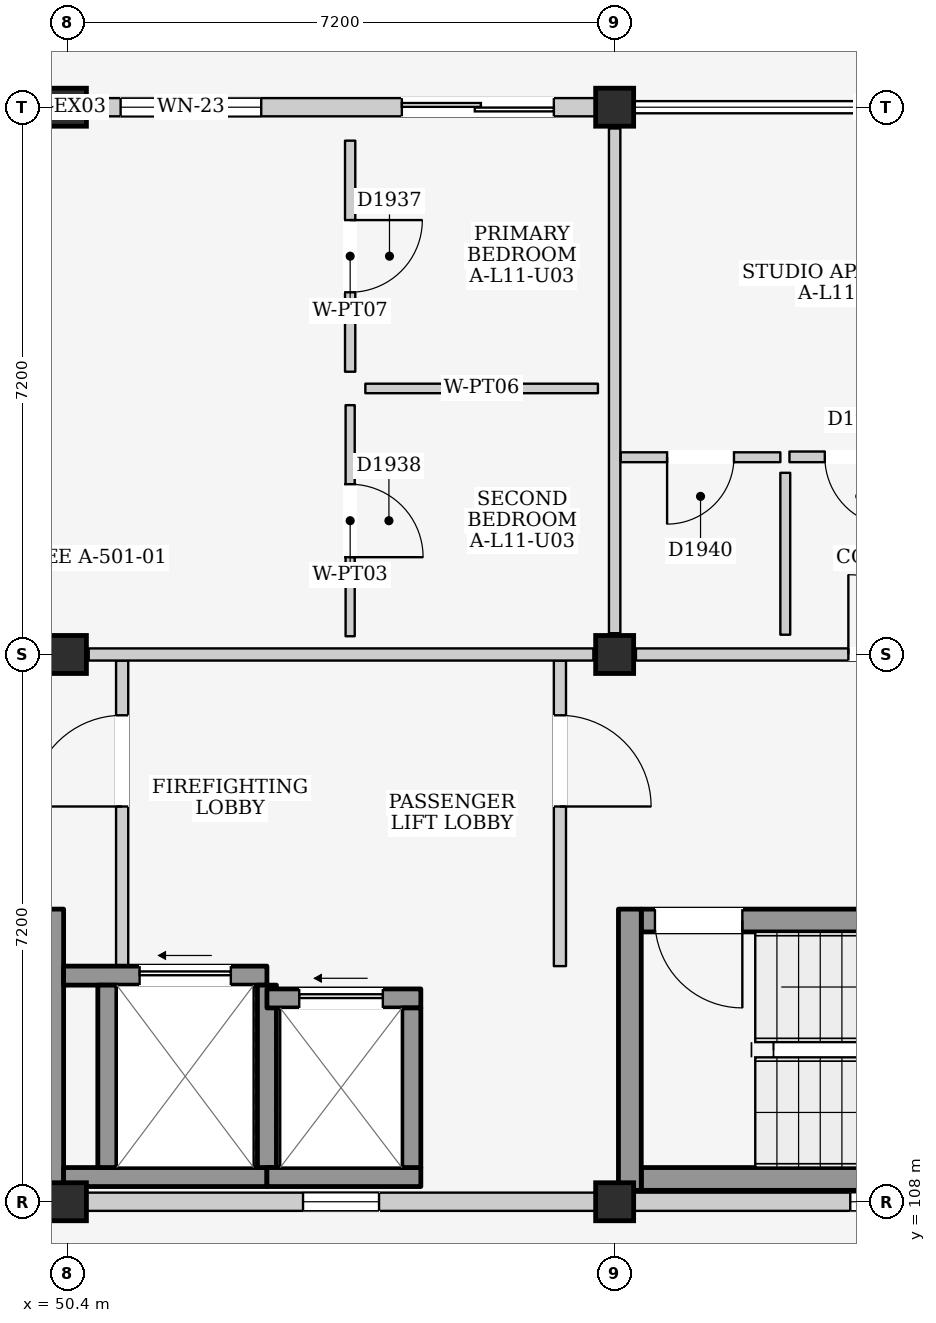
"""IFC4 building model, lengths in metres.
Left out: names, types, materials, properties, quantities, classifications, styles, units other than length and angle.
Written with IfcOpenShell. Run it as: python <this file> out.ifc"""

import sys

from ifc_helpers import new_model, si_unit, direction, frame, frame_2d, origin, origin_2d, place, context, subcontext, project, spatial, rectangle, extrude, element, fill, save


model = new_model("IFC4")
c1 = context("Model", 3, precision=1e-05, world=origin(), true_north=direction((0.0, 1.0)))
c2 = subcontext(c1, "Body", "Model", "MODEL_VIEW")
j1 = project(units=[si_unit("LENGTHUNIT", "METRE"), si_unit("PLANEANGLEUNIT", "RADIAN")], contexts=[c1])
p1 = place(None, origin())
s1 = spatial("IfcSite", under=j1, at=p1, CompositionType="ELEMENT")
p2 = place(p1, origin())
s2 = spatial("IfcBuilding", under=s1, at=p2, CompositionType="ELEMENT")
p3 = place(p2, frame((0.0, 0.0, 38.0)))
s3 = spatial("IfcBuildingStorey", under=s2, at=p3, CompositionType="ELEMENT", Elevation=38.0)
for number, where, z_axis, x_axis in (
    (1, (50.4, 108.0, 0.0), (0.0, 0.0, 1.0), (1.0, 0.0, 0.0)),
    (2, (50.4, 115.2, 0.0), (0.0, 0.0, 1.0), (1.0, 0.0, 0.0)),
    (3, (50.4, 122.4, 0.0), (0.0, 0.0, 1.0), (1.0, 0.0, 0.0)),
    (4, (57.6, 108.0, 0.0), (0.0, 0.0, 1.0), (1.0, 0.0, 0.0)),
    (5, (57.6, 115.2, 0.0), (0.0, 0.0, 1.0), (1.0, 0.0, 0.0)),
    (6, (57.6, 122.4, 0.0), (0.0, 0.0, 1.0), (1.0, 0.0, 0.0)),
):
    element("IfcColumn", number, at=place(p3, frame(where, z_axis=z_axis, x_axis=x_axis)), inside=s3, PredefinedType="COLUMN", context=c2, shape_type="SweptSolid", body=[
        extrude(rectangle(XDim=0.5, YDim=0.5, at=origin_2d()), origin(), (0.0, 0.0, 1.0), 3.2),
    ])
p4 = place(p3, frame((50.65, 122.4, 0.0), z_axis=(0.0, 0.0, 1.0), x_axis=(1.0, 0.0, 0.0)))
e7 = element("IfcWall", 7, at=p4, inside=s3, PredefinedType="ELEMENTEDWALL", context=c2, shape_type="SweptSolid", body=[
    extrude(rectangle(XDim=6.7, YDim=0.24, at=frame_2d((3.35, 0.0))), origin(), (0.0, 0.0, 1.0), 2.525),
])
p5 = place(p4, frame((4.15, 0.0, 0.0)))
e8 = element("IfcOpeningElement", 8, at=p5, cuts=e7, PredefinedType="OPENING", context=c2, shape_type="SweptSolid", body=[
    extrude(rectangle(XDim=2.0, YDim=2.12, at=frame_2d((1.0, 1.06))), frame((0.0, 0.135, 0.0), z_axis=(0.0, -1.0, 0.0), x_axis=(1.0, 0.0, 0.0)), (0.0, 0.0, 1.0), 0.27),
])
p6 = place(p4, frame((0.45, 0.0, 0.9)))
e9 = element("IfcOpeningElement", 9, at=p6, cuts=e7, PredefinedType="OPENING", context=c2, shape_type="SweptSolid", body=[
    extrude(rectangle(XDim=1.85, YDim=1.4, at=frame_2d((0.925, 0.7))), frame((0.0, 0.135, 0.0), z_axis=(0.0, -1.0, 0.0), x_axis=(1.0, 0.0, 0.0)), (0.0, 0.0, 1.0), 0.27),
])
p7 = place(p3, frame((50.65, 108.0, 0.0), z_axis=(0.0, 0.0, 1.0), x_axis=(1.0, 0.0, 0.0)))
e10 = element("IfcWall", 10, at=p7, inside=s3, PredefinedType="ELEMENTEDWALL", context=c2, shape_type="SweptSolid", body=[
    extrude(rectangle(XDim=6.7, YDim=0.24, at=frame_2d((3.35, 0.0))), origin(), (0.0, 0.0, 1.0), 2.325),
])
p8 = place(p7, frame((2.85, 0.0, 1.2)))
e11 = element("IfcOpeningElement", 11, at=p8, cuts=e10, PredefinedType="OPENING", context=c2, shape_type="SweptSolid", body=[
    extrude(rectangle(XDim=1.0, YDim=0.9, at=frame_2d((0.5, 0.45))), frame((0.0, 0.135, 0.0), z_axis=(0.0, -1.0, 0.0), x_axis=(1.0, 0.0, 0.0)), (0.0, 0.0, 1.0), 0.27),
])
p9 = place(p3, frame((57.85, 108.0, 0.0), z_axis=(0.0, 0.0, 1.0), x_axis=(1.0, 0.0, 0.0)))
e12 = element("IfcWall", 12, at=p9, inside=s3, PredefinedType="ELEMENTEDWALL", context=c2, shape_type="SweptSolid", body=[
    extrude(rectangle(XDim=6.7, YDim=0.24, at=frame_2d((3.35, 0.0))), origin(), (0.0, 0.0, 1.0), 2.325),
])
p10 = place(p9, frame((2.85, 0.0, 1.2)))
e13 = element("IfcOpeningElement", 13, at=p10, cuts=e12, PredefinedType="OPENING", context=c2, shape_type="SweptSolid", body=[
    extrude(rectangle(XDim=1.0, YDim=0.9, at=frame_2d((0.5, 0.45))), frame((0.0, 0.135, 0.0), z_axis=(0.0, -1.0, 0.0), x_axis=(1.0, 0.0, 0.0)), (0.0, 0.0, 1.0), 0.27),
])
p11 = place(p3, frame((50.2, 108.15, 0.0), z_axis=(0.0, 0.0, 1.0), x_axis=(0.0, 1.0, 0.0)))
e14 = element("IfcWall", 14, at=p11, inside=s3, PredefinedType="SHEAR", context=c2, shape_type="SweptSolid", body=[
    extrude(rectangle(XDim=3.7, YDim=0.3, at=frame_2d((1.85, 0.0))), origin(), (0.0, 0.0, 1.0), 2.99),
])
p12 = place(p3, frame((51.12, 111.1, 0.0), z_axis=(0.0, 0.0, 1.0), x_axis=(0.0, 1.0, 0.0)))
e15 = element("IfcWall", 15, at=p12, inside=s3, PredefinedType="PARTITIONING", context=c2, shape_type="SweptSolid", body=[
    extrude(rectangle(XDim=4.02, YDim=0.16, at=frame_2d((2.01, 0.0))), origin(), (0.0, 0.0, 1.0), 2.99),
])
p13 = place(p12, frame((2.1, 0.0, 0.0)))
e16 = element("IfcOpeningElement", 16, at=p13, cuts=e15, PredefinedType="OPENING", context=c2, shape_type="SweptSolid", body=[
    extrude(rectangle(XDim=1.2, YDim=2.2, at=frame_2d((0.6, 1.1))), frame((0.0, 0.095, 0.0), z_axis=(0.0, -1.0, 0.0), x_axis=(1.0, 0.0, 0.0)), (0.0, 0.0, 1.0), 0.19),
])
p14 = place(p3, frame((56.88, 111.1, 0.0), z_axis=(0.0, 0.0, 1.0), x_axis=(0.0, 1.0, 0.0)))
e17 = element("IfcWall", 17, at=p14, inside=s3, PredefinedType="PARTITIONING", context=c2, shape_type="SweptSolid", body=[
    extrude(rectangle(XDim=4.02, YDim=0.16, at=frame_2d((2.01, 0.0))), origin(), (0.0, 0.0, 1.0), 2.99),
])
p15 = place(p14, frame((2.1, 0.0, 0.0)))
e18 = element("IfcOpeningElement", 18, at=p15, cuts=e17, PredefinedType="OPENING", context=c2, shape_type="SweptSolid", body=[
    extrude(rectangle(XDim=1.2, YDim=2.2, at=frame_2d((0.6, 1.1))), frame((0.0, 0.095, 0.0), z_axis=(0.0, -1.0, 0.0), x_axis=(1.0, 0.0, 0.0)), (0.0, 0.0, 1.0), 0.19),
])
p16 = place(p3, frame((50.35, 108.325, 0.0), z_axis=(0.0, 0.0, 1.0), x_axis=(1.0, 0.0, 0.0)))
e19 = element("IfcWall", 19, at=p16, inside=s3, PredefinedType="SHEAR", context=c2, shape_type="SweptSolid", body=[
    extrude(rectangle(XDim=2.675, YDim=0.25, at=frame_2d((1.337, 0.0))), origin(), (0.0, 0.0, 1.0), 2.99),
])
p17 = place(p3, frame((50.35, 110.975, 0.0), z_axis=(0.0, 0.0, 1.0), x_axis=(1.0, 0.0, 0.0)))
e20 = element("IfcWall", 20, at=p17, inside=s3, PredefinedType="SHEAR", context=c2, shape_type="SweptSolid", body=[
    extrude(rectangle(XDim=2.675, YDim=0.25, at=frame_2d((1.337, 0.0))), origin(), (0.0, 0.0, 1.0), 2.99),
])
p18 = place(p17, frame((1.0, 0.0, 0.0)))
e21 = element("IfcOpeningElement", 21, at=p18, cuts=e20, PredefinedType="OPENING", context=c2, shape_type="SweptSolid", body=[
    extrude(rectangle(XDim=1.2, YDim=2.25, at=frame_2d((0.6, 1.125))), frame((0.0, 0.14, 0.0), z_axis=(0.0, -1.0, 0.0), x_axis=(1.0, 0.0, 0.0)), (0.0, 0.0, 1.0), 0.28),
])
for number, where, z_axis, x_axis in (
    (22, (50.925, 108.45, 0.0), (0.0, 0.0, 1.0), (0.0, 1.0, 0.0)),
    (23, (53.025, 108.45, 0.0), (0.0, 0.0, 1.0), (0.0, 1.0, 0.0)),
):
    element("IfcWall", number, at=place(p3, frame(where, z_axis=z_axis, x_axis=x_axis)), inside=s3, PredefinedType="SHEAR", context=c2, shape_type="SweptSolid", body=[
        extrude(rectangle(XDim=2.4, YDim=0.25, at=frame_2d((1.2, 0.0))), origin(), (0.0, 0.0, 1.0), 2.99),
    ])
p19 = place(p3, frame((53.025, 108.325, 0.0), z_axis=(0.0, 0.0, 1.0), x_axis=(1.0, 0.0, 0.0)))
e24 = element("IfcWall", 24, at=p19, inside=s3, PredefinedType="SHEAR", context=c2, shape_type="SweptSolid", body=[
    extrude(rectangle(XDim=2.025, YDim=0.25, at=frame_2d((1.013, 0.0))), origin(), (0.0, 0.0, 1.0), 2.99),
])
p20 = place(p3, frame((53.025, 110.675, 0.0), z_axis=(0.0, 0.0, 1.0), x_axis=(1.0, 0.0, 0.0)))
e25 = element("IfcWall", 25, at=p20, inside=s3, PredefinedType="SHEAR", context=c2, shape_type="SweptSolid", body=[
    extrude(rectangle(XDim=2.025, YDim=0.25, at=frame_2d((1.013, 0.0))), origin(), (0.0, 0.0, 1.0), 2.99),
])
p21 = place(p20, frame((0.425, 0.0, 0.0)))
e26 = element("IfcOpeningElement", 26, at=p21, cuts=e25, PredefinedType="OPENING", context=c2, shape_type="SweptSolid", body=[
    extrude(rectangle(XDim=1.1, YDim=2.15, at=frame_2d((0.55, 1.075))), frame((0.0, 0.14, 0.0), z_axis=(0.0, -1.0, 0.0), x_axis=(1.0, 0.0, 0.0)), (0.0, 0.0, 1.0), 0.28),
])
p22 = place(p3, frame((54.925, 108.45, 0.0), z_axis=(0.0, 0.0, 1.0), x_axis=(0.0, 1.0, 0.0)))
e27 = element("IfcWall", 27, at=p22, inside=s3, PredefinedType="SHEAR", context=c2, shape_type="SweptSolid", body=[
    extrude(rectangle(XDim=2.1, YDim=0.25, at=frame_2d((1.05, 0.0))), origin(), (0.0, 0.0, 1.0), 2.99),
])
p23 = place(p3, frame((57.95, 108.3, 0.0), z_axis=(0.0, 0.0, 1.0), x_axis=(1.0, 0.0, 0.0)))
e28 = element("IfcWall", 28, at=p23, inside=s3, PredefinedType="SHEAR", context=c2, shape_type="SweptSolid", body=[
    extrude(rectangle(XDim=6.5, YDim=0.3, at=frame_2d((3.25, 0.0))), origin(), (0.0, 0.0, 1.0), 2.99),
])
p24 = place(p3, frame((57.95, 111.7, 0.0), z_axis=(0.0, 0.0, 1.0), x_axis=(1.0, 0.0, 0.0)))
e29 = element("IfcWall", 29, at=p24, inside=s3, PredefinedType="SHEAR", context=c2, shape_type="SweptSolid", body=[
    extrude(rectangle(XDim=6.5, YDim=0.3, at=frame_2d((3.25, 0.0))), origin(), (0.0, 0.0, 1.0), 2.99),
])
p25 = place(p24, frame((0.18, 0.0, 0.0)))
e30 = element("IfcOpeningElement", 30, at=p25, cuts=e29, PredefinedType="OPENING", context=c2, shape_type="SweptSolid", body=[
    extrude(rectangle(XDim=1.15, YDim=2.2, at=frame_2d((0.575, 1.1))), frame((0.0, 0.165, 0.0), z_axis=(0.0, -1.0, 0.0), x_axis=(1.0, 0.0, 0.0)), (0.0, 0.0, 1.0), 0.33),
])
p26 = place(p3, frame((57.8, 108.15, 0.0), z_axis=(0.0, 0.0, 1.0), x_axis=(0.0, 1.0, 0.0)))
e31 = element("IfcWall", 31, at=p26, inside=s3, PredefinedType="SHEAR", context=c2, shape_type="SweptSolid", body=[
    extrude(rectangle(XDim=3.7, YDim=0.3, at=frame_2d((1.85, 0.0))), origin(), (0.0, 0.0, 1.0), 2.99),
])
p27 = place(p3, frame((50.68, 115.2, 0.0), z_axis=(0.0, 0.0, 1.0), x_axis=(1.0, 0.0, 0.0)))
e32 = element("IfcWall", 32, at=p27, inside=s3, PredefinedType="PARTITIONING", context=c2, shape_type="SweptSolid", body=[
    extrude(rectangle(XDim=6.64, YDim=0.16, at=frame_2d((3.32, 0.0))), origin(), (0.0, 0.0, 1.0), 2.325),
])
p28 = place(p3, frame((57.6, 115.48, 0.0), z_axis=(0.0, 0.0, 1.0), x_axis=(0.0, 1.0, 0.0)))
e33 = element("IfcWall", 33, at=p28, inside=s3, PredefinedType="PARTITIONING", context=c2, shape_type="SweptSolid", body=[
    extrude(rectangle(XDim=6.64, YDim=0.15, at=frame_2d((3.32, 0.0))), origin(), (0.0, 0.0, 1.0), 2.475),
])
p29 = place(p3, frame((54.12, 118.92, 0.0), z_axis=(0.0, 0.0, 1.0), x_axis=(0.0, 1.0, 0.0)))
e34 = element("IfcWall", 34, at=p29, inside=s3, PredefinedType="PARTITIONING", context=c2, shape_type="SweptSolid", body=[
    extrude(rectangle(XDim=3.04, YDim=0.135, at=frame_2d((1.52, 0.0))), origin(), (0.0, 0.0, 1.0), 2.99),
])
p30 = place(p29, frame((1.045, 0.0, 0.0)))
e35 = element("IfcOpeningElement", 35, at=p30, cuts=e34, PredefinedType="OPENING", context=c2, shape_type="SweptSolid", body=[
    extrude(rectangle(XDim=0.95, YDim=2.15, at=frame_2d((0.475, 1.075))), frame((0.0, 0.083, 0.0), z_axis=(0.0, -1.0, 0.0), x_axis=(1.0, 0.0, 0.0)), (0.0, 0.0, 1.0), 0.165),
])
p31 = place(p3, frame((54.32, 118.7, 0.0), z_axis=(0.0, 0.0, 1.0), x_axis=(1.0, 0.0, 0.0)))
e36 = element("IfcWall", 36, at=p31, inside=s3, PredefinedType="PARTITIONING", context=c2, shape_type="SweptSolid", body=[
    extrude(rectangle(XDim=3.06, YDim=0.125, at=frame_2d((1.53, 0.0))), origin(), (0.0, 0.0, 1.0), 2.99),
])
p32 = place(p3, frame((54.12, 115.44, 0.0), z_axis=(0.0, 0.0, 1.0), x_axis=(0.0, 1.0, 0.0)))
e37 = element("IfcWall", 37, at=p32, inside=s3, PredefinedType="PARTITIONING", context=c2, shape_type="SweptSolid", body=[
    extrude(rectangle(XDim=3.04, YDim=0.12, at=frame_2d((1.52, 0.0))), origin(), (0.0, 0.0, 1.0), 2.99),
])
p33 = place(p32, frame((1.04, 0.0, 0.0)))
e38 = element("IfcOpeningElement", 38, at=p33, cuts=e37, PredefinedType="OPENING", context=c2, shape_type="SweptSolid", body=[
    extrude(rectangle(XDim=0.96, YDim=2.15, at=frame_2d((0.48, 1.075))), frame((0.0, 0.075, 0.0), z_axis=(0.0, -1.0, 0.0), x_axis=(1.0, 0.0, 0.0)), (0.0, 0.0, 1.0), 0.15),
])
p34 = place(p3, frame((57.88, 115.2, 0.0), z_axis=(0.0, 0.0, 1.0), x_axis=(1.0, 0.0, 0.0)))
e39 = element("IfcWall", 39, at=p34, inside=s3, PredefinedType="PARTITIONING", context=c2, shape_type="SweptSolid", body=[
    extrude(rectangle(XDim=6.64, YDim=0.16, at=frame_2d((3.32, 0.0))), origin(), (0.0, 0.0, 1.0), 2.325),
])
p35 = place(p34, frame((2.795, 0.0, 0.0)))
e40 = element("IfcOpeningElement", 40, at=p35, cuts=e39, PredefinedType="OPENING", context=c2, shape_type="SweptSolid", body=[
    extrude(rectangle(XDim=1.05, YDim=2.15, at=frame_2d((0.525, 1.075))), frame((0.0, 0.095, 0.0), z_axis=(0.0, -1.0, 0.0), x_axis=(1.0, 0.0, 0.0)), (0.0, 0.0, 1.0), 0.19),
])
p36 = place(p3, frame((57.68, 117.795, 0.0), z_axis=(0.0, 0.0, 1.0), x_axis=(1.0, 0.0, 0.0)))
e41 = element("IfcWall", 41, at=p36, inside=s3, PredefinedType="PARTITIONING", context=c2, shape_type="SweptSolid", body=[
    extrude(rectangle(XDim=2.1, YDim=0.13, at=frame_2d((1.05, 0.0))), origin(), (0.0, 0.0, 1.0), 2.99),
])
p37 = place(p36, frame((0.61, 0.0, 0.0)))
e42 = element("IfcOpeningElement", 42, at=p37, cuts=e41, PredefinedType="OPENING", context=c2, shape_type="SweptSolid", body=[
    extrude(rectangle(XDim=0.88, YDim=2.1, at=frame_2d((0.44, 1.05))), frame((0.0, 0.08, 0.0), z_axis=(0.0, -1.0, 0.0), x_axis=(1.0, 0.0, 0.0)), (0.0, 0.0, 1.0), 0.16),
])
p38 = place(p3, frame((59.845, 115.46, 0.0), z_axis=(0.0, 0.0, 1.0), x_axis=(0.0, 1.0, 0.0)))
e43 = element("IfcWall", 43, at=p38, inside=s3, PredefinedType="PARTITIONING", context=c2, shape_type="SweptSolid", body=[
    extrude(rectangle(XDim=2.13, YDim=0.13, at=frame_2d((1.065, 0.0))), origin(), (0.0, 0.0, 1.0), 2.99),
])
p39 = place(p3, frame((59.9, 117.8, 0.0), z_axis=(0.0, 0.0, 1.0), x_axis=(1.0, 0.0, 0.0)))
e44 = element("IfcWall", 44, at=p39, inside=s3, PredefinedType="PARTITIONING", context=c2, shape_type="SweptSolid", body=[
    extrude(rectangle(XDim=1.85, YDim=0.14, at=frame_2d((0.925, 0.0))), origin(), (0.0, 0.0, 1.0), 2.99),
])
p40 = place(p39, frame((0.465, 0.0, 0.0)))
e45 = element("IfcOpeningElement", 45, at=p40, cuts=e44, PredefinedType="OPENING", context=c2, shape_type="SweptSolid", body=[
    extrude(rectangle(XDim=0.92, YDim=2.1, at=frame_2d((0.46, 1.05))), frame((0.0, 0.085, 0.0), z_axis=(0.0, -1.0, 0.0), x_axis=(1.0, 0.0, 0.0)), (0.0, 0.0, 1.0), 0.17),
])
p41 = place(p5, frame((2.0, 0.0, 0.0), z_axis=(0.0, 0.0, 1.0), x_axis=(-1.0, 0.0, 0.0)))
e46 = element("IfcDoor", 46, at=p41, inside=s3, OperationType="DOUBLE_DOOR_SLIDING", PredefinedType="DOOR", context=c2, shape_type="SweptSolid", body=[
    extrude(rectangle(XDim=2.0, YDim=2.12, at=frame_2d((1.0, 1.06))), frame((0.0, 0.025, 0.0), z_axis=(0.0, -1.0, 0.0), x_axis=(1.0, 0.0, 0.0)), (0.0, 0.0, 1.0), 0.05),
])
fill(e8, e46)
p42 = place(p6, origin())
e47 = element("IfcWindow", 47, at=p42, inside=s3, PartitioningType="DOUBLE_PANEL_VERTICAL", PredefinedType="WINDOW", context=c2, shape_type="SweptSolid", body=[
    extrude(rectangle(XDim=1.85, YDim=1.4, at=frame_2d((0.925, 0.7))), frame((0.0, 0.03, 0.0), z_axis=(0.0, -1.0, 0.0), x_axis=(1.0, 0.0, 0.0)), (0.0, 0.0, 1.0), 0.06),
])
fill(e9, e47)
p43 = place(p8, origin())
e48 = element("IfcWindow", 48, at=p43, inside=s3, PartitioningType="SINGLE_PANEL", PredefinedType="WINDOW", context=c2, shape_type="SweptSolid", body=[
    extrude(rectangle(XDim=1.0, YDim=0.9, at=frame_2d((0.5, 0.45))), frame((0.0, 0.03, 0.0), z_axis=(0.0, -1.0, 0.0), x_axis=(1.0, 0.0, 0.0)), (0.0, 0.0, 1.0), 0.06),
])
fill(e11, e48)
p44 = place(p10, origin())
e49 = element("IfcWindow", 49, at=p44, inside=s3, PartitioningType="SINGLE_PANEL", PredefinedType="WINDOW", context=c2, shape_type="SweptSolid", body=[
    extrude(rectangle(XDim=1.0, YDim=0.9, at=frame_2d((0.5, 0.45))), frame((0.0, 0.03, 0.0), z_axis=(0.0, -1.0, 0.0), x_axis=(1.0, 0.0, 0.0)), (0.0, 0.0, 1.0), 0.06),
])
fill(e13, e49)
p45 = place(p13, origin())
e50 = element("IfcDoor", 50, at=p45, inside=s3, OperationType="SINGLE_SWING_LEFT", PredefinedType="DOOR", context=c2, shape_type="SweptSolid", body=[
    extrude(rectangle(XDim=1.2, YDim=2.2, at=frame_2d((0.6, 1.1))), frame((0.0, 0.025, 0.0), z_axis=(0.0, -1.0, 0.0), x_axis=(1.0, 0.0, 0.0)), (0.0, 0.0, 1.0), 0.05),
])
fill(e16, e50)
p46 = place(p15, frame((1.2, 0.0, 0.0), z_axis=(0.0, 0.0, 1.0), x_axis=(-1.0, 0.0, 0.0)))
e51 = element("IfcDoor", 51, at=p46, inside=s3, OperationType="SINGLE_SWING_RIGHT", PredefinedType="DOOR", context=c2, shape_type="SweptSolid", body=[
    extrude(rectangle(XDim=1.2, YDim=2.2, at=frame_2d((0.6, 1.1))), frame((0.0, 0.025, 0.0), z_axis=(0.0, -1.0, 0.0), x_axis=(1.0, 0.0, 0.0)), (0.0, 0.0, 1.0), 0.05),
])
fill(e18, e51)
p47 = place(p18, origin())
e52 = element("IfcDoor", 52, at=p47, inside=s3, OperationType="SLIDING_TO_LEFT", PredefinedType="DOOR", context=c2, shape_type="SweptSolid", body=[
    extrude(rectangle(XDim=1.2, YDim=2.25, at=frame_2d((0.6, 1.125))), frame((0.0, 0.025, 0.0), z_axis=(0.0, -1.0, 0.0), x_axis=(1.0, 0.0, 0.0)), (0.0, 0.0, 1.0), 0.05),
])
fill(e21, e52)
p48 = place(p21, origin())
e53 = element("IfcDoor", 53, at=p48, inside=s3, OperationType="SLIDING_TO_LEFT", PredefinedType="DOOR", context=c2, shape_type="SweptSolid", body=[
    extrude(rectangle(XDim=1.1, YDim=2.15, at=frame_2d((0.55, 1.075))), frame((0.0, 0.025, 0.0), z_axis=(0.0, -1.0, 0.0), x_axis=(1.0, 0.0, 0.0)), (0.0, 0.0, 1.0), 0.05),
])
fill(e26, e53)
p49 = place(p25, frame((1.15, 0.0, 0.0), z_axis=(0.0, 0.0, 1.0), x_axis=(-1.0, 0.0, 0.0)))
e54 = element("IfcDoor", 54, at=p49, inside=s3, OperationType="SINGLE_SWING_LEFT", PredefinedType="DOOR", context=c2, shape_type="SweptSolid", body=[
    extrude(rectangle(XDim=1.15, YDim=2.2, at=frame_2d((0.575, 1.1))), frame((0.0, 0.025, 0.0), z_axis=(0.0, -1.0, 0.0), x_axis=(1.0, 0.0, 0.0)), (0.0, 0.0, 1.0), 0.05),
])
fill(e30, e54)
p50 = place(p30, frame((0.95, 0.0, 0.0), z_axis=(0.0, 0.0, 1.0), x_axis=(-1.0, 0.0, 0.0)))
e55 = element("IfcDoor", 55, at=p50, inside=s3, OperationType="SINGLE_SWING_LEFT", PredefinedType="DOOR", context=c2, shape_type="SweptSolid", body=[
    extrude(rectangle(XDim=0.95, YDim=2.15, at=frame_2d((0.475, 1.075))), frame((0.0, 0.025, 0.0), z_axis=(0.0, -1.0, 0.0), x_axis=(1.0, 0.0, 0.0)), (0.0, 0.0, 1.0), 0.05),
])
fill(e35, e55)
p51 = place(p33, frame((0.96, 0.0, 0.0), z_axis=(0.0, 0.0, 1.0), x_axis=(-1.0, 0.0, 0.0)))
e56 = element("IfcDoor", 56, at=p51, inside=s3, OperationType="SINGLE_SWING_RIGHT", PredefinedType="DOOR", context=c2, shape_type="SweptSolid", body=[
    extrude(rectangle(XDim=0.96, YDim=2.15, at=frame_2d((0.48, 1.075))), frame((0.0, 0.025, 0.0), z_axis=(0.0, -1.0, 0.0), x_axis=(1.0, 0.0, 0.0)), (0.0, 0.0, 1.0), 0.05),
])
fill(e38, e56)
p52 = place(p35, origin())
e57 = element("IfcDoor", 57, at=p52, inside=s3, OperationType="SINGLE_SWING_LEFT", PredefinedType="DOOR", context=c2, shape_type="SweptSolid", body=[
    extrude(rectangle(XDim=1.05, YDim=2.15, at=frame_2d((0.525, 1.075))), frame((0.0, 0.025, 0.0), z_axis=(0.0, -1.0, 0.0), x_axis=(1.0, 0.0, 0.0)), (0.0, 0.0, 1.0), 0.05),
])
fill(e40, e57)
p53 = place(p37, frame((0.88, 0.0, 0.0), z_axis=(0.0, 0.0, 1.0), x_axis=(-1.0, 0.0, 0.0)))
e58 = element("IfcDoor", 58, at=p53, inside=s3, OperationType="SINGLE_SWING_RIGHT", PredefinedType="DOOR", context=c2, shape_type="SweptSolid", body=[
    extrude(rectangle(XDim=0.88, YDim=2.1, at=frame_2d((0.44, 1.05))), frame((0.0, 0.025, 0.0), z_axis=(0.0, -1.0, 0.0), x_axis=(1.0, 0.0, 0.0)), (0.0, 0.0, 1.0), 0.05),
])
fill(e42, e58)
p54 = place(p40, frame((0.92, 0.0, 0.0), z_axis=(0.0, 0.0, 1.0), x_axis=(-1.0, 0.0, 0.0)))
e59 = element("IfcDoor", 59, at=p54, inside=s3, OperationType="SINGLE_SWING_LEFT", PredefinedType="DOOR", context=c2, shape_type="SweptSolid", body=[
    extrude(rectangle(XDim=0.92, YDim=2.1, at=frame_2d((0.46, 1.05))), frame((0.0, 0.025, 0.0), z_axis=(0.0, -1.0, 0.0), x_axis=(1.0, 0.0, 0.0)), (0.0, 0.0, 1.0), 0.05),
])
fill(e45, e59)
save(model, sys.argv[1])
